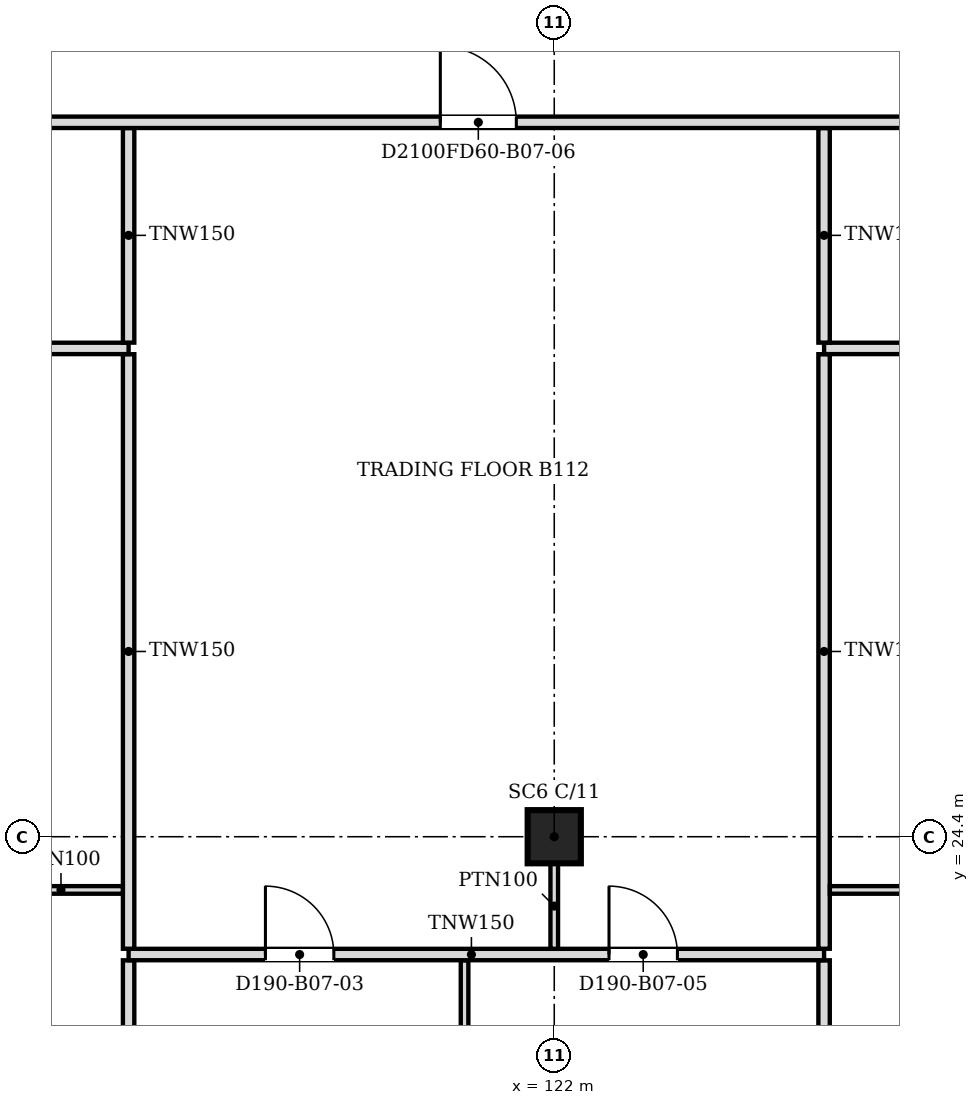
"""IFC4 building model, lengths in metres.
Left out: names, types, materials, properties, quantities, classifications, styles, units other than length and angle.
Written with IfcOpenShell. Run it as: python <this file> out.ifc"""

import sys

from ifc_helpers import new_model, si_unit, direction, frame, frame_2d, origin, origin_2d, place, context, subcontext, project, spatial, rectangle, extrude, source, transform, mapped, element, fill, save


model = new_model("IFC4")
c1 = context("Model", 3, precision=1e-05, world=origin(), true_north=direction((0.0, 1.0)))
c2 = subcontext(c1, "Body", "Model", "MODEL_VIEW")
j1 = project(units=[si_unit("LENGTHUNIT", "METRE"), si_unit("PLANEANGLEUNIT", "RADIAN")], contexts=[c1])
p1 = place(None, origin())
s1 = spatial("IfcSite", under=j1, at=p1, CompositionType="ELEMENT")
p2 = place(p1, origin())
s2 = spatial("IfcBuilding", under=s1, at=p2, CompositionType="ELEMENT")
p3 = place(p2, frame((0.0, 0.0, 68.6)))
s3 = spatial("IfcBuildingStorey", under=s2, at=p3, CompositionType="ELEMENT", Elevation=68.6)
p4 = place(p3, frame((122.0, 24.4, 0.0), z_axis=(0.0, 0.0, 1.0), x_axis=(1.0, 0.0, 0.0)))
e1 = element("IfcColumn", 1, at=p4, inside=s3, PredefinedType="COLUMN", context=c2, shape_type="SweptSolid", body=[
    extrude(rectangle(XDim=0.7, YDim=0.7, at=origin_2d()), origin(), (0.0, 0.0, 1.0), 3.6),
])
p5 = place(p3, frame((116.4, 18.8, 0.0), z_axis=(0.0, 0.0, 1.0), x_axis=(0.0, 1.0, 0.0)))
e2 = element("IfcWall", 2, at=p5, inside=s3, PredefinedType="PARTITIONING", context=c2, shape_type="SweptSolid", body=[
    extrude(rectangle(XDim=3.974, YDim=0.15, at=frame_2d((1.987, 0.0))), origin(), (0.0, 0.0, 1.0), 3.067),
])
p6 = place(p3, frame((120.82, 18.8, 0.0), z_axis=(0.0, 0.0, 1.0), x_axis=(0.0, 1.0, 0.0)))
e3 = element("IfcWall", 3, at=p6, inside=s3, PredefinedType="PARTITIONING", context=c2, shape_type="SweptSolid", body=[
    extrude(rectangle(XDim=3.974, YDim=0.1, at=frame_2d((1.987, 0.0))), origin(), (0.0, 0.0, 1.0), 3.067),
])
p7 = place(p3, frame((125.55, 18.8, 0.0), z_axis=(0.0, 0.0, 1.0), x_axis=(0.0, 1.0, 0.0)))
e4 = element("IfcWall", 4, at=p7, inside=s3, PredefinedType="PARTITIONING", context=c2, shape_type="SweptSolid", body=[
    extrude(rectangle(XDim=3.974, YDim=0.15, at=frame_2d((1.987, 0.0))), origin(), (0.0, 0.0, 1.0), 3.067),
])
p8 = place(p3, frame((125.55, 22.85, 0.0), z_axis=(0.0, 0.0, 1.0), x_axis=(-1.0, 0.0, 0.0)))
e5 = element("IfcWall", 5, at=p8, inside=s3, PredefinedType="PARTITIONING", context=c2, shape_type="SweptSolid", body=[
    extrude(rectangle(XDim=9.15, YDim=0.15, at=frame_2d((4.575, 0.0))), origin(), (0.0, 0.0, 1.0), 3.067),
])
m1 = source(origin(), c2, "Body", "SweptSolid", [
    extrude(rectangle(XDim=0.9, YDim=2.1, at=frame_2d((0.45, 1.05))), frame((0.0, 0.085, 0.0), z_axis=(0.0, -1.0, 0.0), x_axis=(1.0, 0.0, 0.0)), (0.0, 0.0, 1.0), 0.17),
])
p9 = place(p8, frame((6.45, 0.0, 0.0)))
e6 = element("IfcOpeningElement", 6, at=p9, cuts=e5, PredefinedType="OPENING", context=c2, shape_type="MappedRepresentation", body=[
    mapped(m1, transform((0.0, 0.0, 0.0), scale=1.0)),
])
p10 = place(p8, frame((1.93, 0.0, 0.0)))
e7 = element("IfcOpeningElement", 7, at=p10, cuts=e5, PredefinedType="OPENING", context=c2, shape_type="MappedRepresentation", body=[
    mapped(m1, transform((0.0, 0.0, 0.0), scale=1.0)),
])
for number, where, z_axis, x_axis in (
    (8, (116.4, 22.926, 0.0), (0.0, 0.0, 1.0), (0.0, 1.0, 0.0)),
    (9, (125.55, 22.926, 0.0), (0.0, 0.0, 1.0), (0.0, 1.0, 0.0)),
):
    element("IfcWall", number, at=place(p3, frame(where, z_axis=z_axis, x_axis=x_axis)), inside=s3, PredefinedType="PARTITIONING", context=c2, shape_type="SweptSolid", body=[
        extrude(rectangle(XDim=7.823, YDim=0.15, at=frame_2d((3.912, 0.0))), origin(), (0.0, 0.0, 1.0), 3.067),
    ])
p11 = place(p3, frame((116.324, 23.7, 0.0), z_axis=(0.0, 0.0, 1.0), x_axis=(-1.0, 0.0, 0.0)))
e10 = element("IfcWall", 10, at=p11, inside=s3, PredefinedType="PARTITIONING", context=c2, shape_type="SweptSolid", body=[
    extrude(rectangle(XDim=4.128, YDim=0.1, at=frame_2d((2.064, 0.0))), origin(), (0.0, 0.0, 1.0), 3.067),
])
m2 = source(origin(), c2, "Body", "SweptSolid", [
    extrude(rectangle(XDim=0.9, YDim=2.1, at=frame_2d((0.45, 1.05))), frame((0.0, 0.06, 0.0), z_axis=(0.0, -1.0, 0.0), x_axis=(1.0, 0.0, 0.0)), (0.0, 0.0, 1.0), 0.12),
])
p12 = place(p11, frame((1.628, 0.0, 0.0)))
e11 = element("IfcOpeningElement", 11, at=p12, cuts=e10, PredefinedType="OPENING", context=c2, shape_type="MappedRepresentation", body=[
    mapped(m2, transform((0.0, 0.0, 0.0), scale=1.0)),
])
p13 = place(p3, frame((133.394, 23.7, 0.0), z_axis=(0.0, 0.0, 1.0), x_axis=(-1.0, 0.0, 0.0)))
e12 = element("IfcWall", 12, at=p13, inside=s3, PredefinedType="PARTITIONING", context=c2, shape_type="SweptSolid", body=[
    extrude(rectangle(XDim=7.768, YDim=0.1, at=frame_2d((3.884, 0.0))), origin(), (0.0, 0.0, 1.0), 3.067),
])
p14 = place(p13, frame((3.468, 0.0, 0.0)))
e13 = element("IfcOpeningElement", 13, at=p14, cuts=e12, PredefinedType="OPENING", context=c2, shape_type="MappedRepresentation", body=[
    mapped(m2, transform((0.0, 0.0, 0.0), scale=1.0)),
])
p15 = place(p3, frame((122.0, 24.05, 0.0), z_axis=(0.0, 0.0, 1.0), x_axis=(0.0, -1.0, 0.0)))
e14 = element("IfcWall", 14, at=p15, inside=s3, PredefinedType="PARTITIONING", context=c2, shape_type="SweptSolid", body=[
    extrude(rectangle(XDim=1.125, YDim=0.1, at=frame_2d((0.562, 0.0))), origin(), (0.0, 0.0, 1.0), 3.067),
])
p16 = place(p3, frame((116.4, 30.825, 0.0), z_axis=(0.0, 0.0, 1.0), x_axis=(-1.0, 0.0, 0.0)))
e15 = element("IfcWall", 15, at=p16, inside=s3, PredefinedType="PARTITIONING", context=c2, shape_type="SweptSolid", body=[
    extrude(rectangle(XDim=9.15, YDim=0.15, at=frame_2d((4.575, 0.0))), origin(), (0.0, 0.0, 1.0), 3.067),
])
p17 = place(p16, frame((4.15, 0.0, 0.0)))
e16 = element("IfcOpeningElement", 16, at=p17, cuts=e15, PredefinedType="OPENING", context=c2, shape_type="MappedRepresentation", body=[
    mapped(m1, transform((0.0, 0.0, 0.0), scale=1.0)),
])
p18 = place(p3, frame((133.7, 30.825, 0.0), z_axis=(0.0, 0.0, 1.0), x_axis=(-1.0, 0.0, 0.0)))
e17 = element("IfcWall", 17, at=p18, inside=s3, PredefinedType="PARTITIONING", context=c2, shape_type="SweptSolid", body=[
    extrude(rectangle(XDim=8.15, YDim=0.15, at=frame_2d((4.075, 0.0))), origin(), (0.0, 0.0, 1.0), 3.067),
])
p19 = place(p18, frame((3.65, 0.0, 0.0)))
e18 = element("IfcOpeningElement", 18, at=p19, cuts=e17, PredefinedType="OPENING", context=c2, shape_type="MappedRepresentation", body=[
    mapped(m1, transform((0.0, 0.0, 0.0), scale=1.0)),
])
for number, where, z_axis, x_axis in (
    (19, (116.4, 30.901, 0.0), (0.0, 0.0, 1.0), (0.0, 1.0, 0.0)),
    (20, (125.55, 30.901, 0.0), (0.0, 0.0, 1.0), (0.0, 1.0, 0.0)),
):
    element("IfcWall", number, at=place(p3, frame(where, z_axis=z_axis, x_axis=x_axis)), inside=s3, PredefinedType="PARTITIONING", context=c2, shape_type="SweptSolid", body=[
        extrude(rectangle(XDim=2.823, YDim=0.15, at=frame_2d((1.412, 0.0))), origin(), (0.0, 0.0, 1.0), 3.067),
    ])
p20 = place(p3, frame((133.7, 33.8, 0.0), z_axis=(0.0, 0.0, 1.0), x_axis=(-1.0, 0.0, 0.0)))
e21 = element("IfcWall", 21, at=p20, inside=s3, PredefinedType="PARTITIONING", context=c2, shape_type="SweptSolid", body=[
    extrude(rectangle(XDim=47.8, YDim=0.15, at=frame_2d((23.9, 0.0))), origin(), (0.0, 0.0, 1.0), 3.067),
])
m3 = source(origin(), c2, "Body", "SweptSolid", [
    extrude(rectangle(XDim=1.0, YDim=2.1, at=frame_2d((0.5, 1.05))), frame((0.0, 0.085, 0.0), z_axis=(0.0, -1.0, 0.0), x_axis=(1.0, 0.0, 0.0)), (0.0, 0.0, 1.0), 0.17),
])
p21 = place(p20, frame((3.549, 0.0, 0.0)))
e22 = element("IfcOpeningElement", 22, at=p21, cuts=e21, PredefinedType="OPENING", context=c2, shape_type="MappedRepresentation", body=[
    mapped(m3, transform((0.0, 0.0, 0.0), scale=1.0)),
])
p22 = place(p20, frame((42.7, 0.0, 0.0)))
e23 = element("IfcOpeningElement", 23, at=p22, cuts=e21, PredefinedType="OPENING", context=c2, shape_type="MappedRepresentation", body=[
    mapped(m3, transform((0.0, 0.0, 0.0), scale=1.0)),
])
p23 = place(p20, frame((12.199, 0.0, 0.0)))
e24 = element("IfcOpeningElement", 24, at=p23, cuts=e21, PredefinedType="OPENING", context=c2, shape_type="MappedRepresentation", body=[
    mapped(m3, transform((0.0, 0.0, 0.0), scale=1.0)),
])
p24 = place(p20, frame((21.349, 0.0, 0.0)))
e25 = element("IfcOpeningElement", 25, at=p24, cuts=e21, PredefinedType="OPENING", context=c2, shape_type="MappedRepresentation", body=[
    mapped(m3, transform((0.0, 0.0, 0.0), scale=1.0)),
])
p25 = place(p20, frame((32.05, 0.0, 0.0)))
e26 = element("IfcOpeningElement", 26, at=p25, cuts=e21, PredefinedType="OPENING", context=c2, shape_type="MappedRepresentation", body=[
    mapped(m3, transform((0.0, 0.0, 0.0), scale=1.0)),
])
m4 = source(origin(), c2, "Body", "SweptSolid", [
    extrude(rectangle(XDim=0.9, YDim=2.1, at=frame_2d((0.45, 1.05))), frame((0.0, 0.025, 0.0), z_axis=(0.0, -1.0, 0.0), x_axis=(1.0, 0.0, 0.0)), (0.0, 0.0, 1.0), 0.05),
])
p26 = place(p9, origin())
e27 = element("IfcDoor", 27, at=p26, inside=s3, OperationType="SINGLE_SWING_RIGHT", PredefinedType="DOOR", context=c2, shape_type="MappedRepresentation", body=[
    mapped(m4, transform((0.0, 0.0, 0.0), scale=1.0)),
])
fill(e6, e27)
p27 = place(p10, origin())
e28 = element("IfcDoor", 28, at=p27, inside=s3, OperationType="SINGLE_SWING_RIGHT", PredefinedType="DOOR", context=c2, shape_type="MappedRepresentation", body=[
    mapped(m4, transform((0.0, 0.0, 0.0), scale=1.0)),
])
fill(e7, e28)
m5 = source(origin(), c2, "Body", "SweptSolid", [
    extrude(rectangle(XDim=1.0, YDim=2.1, at=frame_2d((0.5, 1.05))), frame((0.0, 0.025, 0.0), z_axis=(0.0, -1.0, 0.0), x_axis=(1.0, 0.0, 0.0)), (0.0, 0.0, 1.0), 0.05),
])
p28 = place(p23, origin())
e29 = element("IfcDoor", 29, at=p28, inside=s3, OperationType="SINGLE_SWING_RIGHT", PredefinedType="DOOR", context=c2, shape_type="MappedRepresentation", body=[
    mapped(m5, transform((0.0, 0.0, 0.0), scale=1.0)),
])
fill(e24, e29)
save(model, sys.argv[1])
